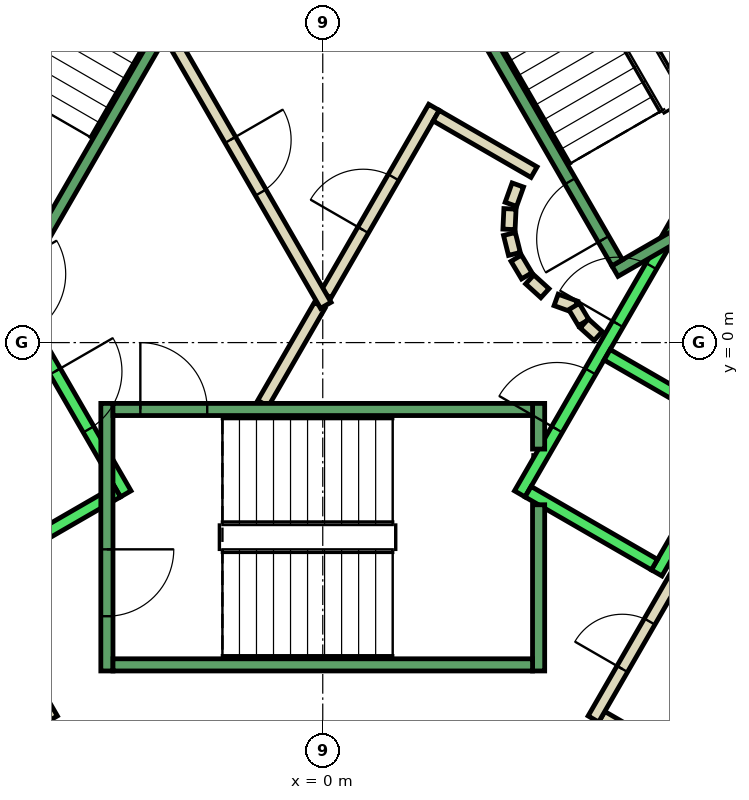
"""IFC4 building model, lengths in metres.
Left out: names, types, materials, properties, quantities, classifications, styles, units other than length and angle.
Written with IfcOpenShell. Run it as: python <this file> out.ifc"""

import sys

from ifc_helpers import new_model, si_unit, direction, frame, frame_2d, origin, place, context, subcontext, project, spatial, polyline, rectangle, outline, extrude, element, fill, save


model = new_model("IFC4")
c1 = context("Model", 3, precision=1e-05, world=origin(), true_north=direction((0.0, 1.0)))
c2 = subcontext(c1, "Body", "Model", "MODEL_VIEW")
j1 = project(units=[si_unit("LENGTHUNIT", "METRE"), si_unit("PLANEANGLEUNIT", "RADIAN")], contexts=[c1])
p1 = place(None, origin())
s1 = spatial("IfcSite", under=j1, at=p1, CompositionType="ELEMENT")
p2 = place(p1, origin())
s2 = spatial("IfcBuilding", under=s1, at=p2, CompositionType="ELEMENT")
p3 = place(p2, frame((0.0, 0.0, 252.2)))
s3 = spatial("IfcBuildingStorey", under=s2, at=p3, CompositionType="ELEMENT", Elevation=252.2)
p4 = place(p3, frame((0.0, 0.0, -0.34)))
e1 = element("IfcWall", 1, at=p4, inside=s3, PredefinedType="SHEAR", context=c2, shape_type="SweptSolid", body=[
    extrude(outline(polyline([(5.774, -7.5), (11.547, 2.5), (10.854, 2.5), (5.427, -6.9), (5.774, -7.5)])), origin(), (0.0, 0.0, 1.0), 3.6),
])
p5 = place(p3, frame((5.541, -6.703, 0.0), z_axis=(0.0, 0.0, 1.0), x_axis=(-0.86621513555, 0.499671230855, 0.0)))
e2 = element("IfcWall", 2, at=p5, inside=s3, PredefinedType="PARTITIONING", context=c2, shape_type="SweptSolid", body=[
    extrude(rectangle(XDim=1.1, YDim=0.2, at=frame_2d((0.55, 0.0))), origin(), (0.0, 0.0, 1.0), 3.26),
])
p6 = place(p3, frame((4.451, -6.19, 0.0), z_axis=(0.0, 0.0, 1.0), x_axis=(0.500011755427, 0.866018616679, 0.0)))
e3 = element("IfcWall", 3, at=p6, inside=s3, PredefinedType="PARTITIONING", context=c2, shape_type="SweptSolid", body=[
    extrude(rectangle(XDim=2.8, YDim=0.2, at=frame_2d((1.4, 0.0))), origin(), (0.0, 0.0, 1.0), 3.26),
])
p7 = place(p6, frame((0.95, 0.0, 0.0)))
e4 = element("IfcOpeningElement", 4, at=p7, cuts=e3, PredefinedType="OPENING", context=c2, shape_type="SweptSolid", body=[
    extrude(rectangle(XDim=0.9, YDim=2.1, at=frame_2d((0.45, 1.05))), frame((0.0, 0.11, 0.0), z_axis=(0.0, -1.0, 0.0), x_axis=(1.0, 0.0, 0.0)), (0.0, 0.0, 1.0), 0.22),
])
p8 = place(p3, frame((-5.851, -3.765, 0.0), z_axis=(0.0, 0.0, 1.0), x_axis=(0.500011755427, -0.866018616679, 0.0)))
e5 = element("IfcWall", 5, at=p8, inside=s3, PredefinedType="PARTITIONING", context=c2, shape_type="SweptSolid", body=[
    extrude(rectangle(XDim=2.8, YDim=0.2, at=frame_2d((1.4, 0.0))), origin(), (0.0, 0.0, 1.0), 3.26),
])
p9 = place(p8, frame((0.95, 0.0, 0.0)))
e6 = element("IfcOpeningElement", 6, at=p9, cuts=e5, PredefinedType="OPENING", context=c2, shape_type="SweptSolid", body=[
    extrude(rectangle(XDim=0.9, YDim=2.1, at=frame_2d((0.45, 1.05))), frame((0.0, 0.11, 0.0), z_axis=(0.0, -1.0, 0.0), x_axis=(1.0, 0.0, 0.0)), (0.0, 0.0, 1.0), 0.22),
])
p10 = place(p3, frame((-0.982, -1.0, 0.0), z_axis=(0.0, 0.0, 1.0), x_axis=(0.50024047865, 0.865886518847, 0.0)))
e7 = element("IfcWall", 7, at=p10, inside=s3, PredefinedType="PARTITIONING", context=c2, shape_type="SweptSolid", body=[
    extrude(rectangle(XDim=1.863, YDim=0.2, at=frame_2d((0.931, 0.0))), origin(), (0.0, 0.0, 1.0), 3.26),
])
p11 = place(p3, frame((0.05, 0.787, 0.0), z_axis=(0.0, 0.0, 1.0), x_axis=(0.499954076797, 0.866051915934, 0.0)))
e8 = element("IfcWall", 8, at=p11, inside=s3, PredefinedType="PARTITIONING", context=c2, shape_type="SweptSolid", body=[
    extrude(rectangle(XDim=3.558, YDim=0.2, at=frame_2d((1.779, 0.0))), origin(), (0.0, 0.0, 1.0), 3.26),
])
p12 = place(p11, frame((1.229, 0.0, 0.0)))
e9 = element("IfcOpeningElement", 9, at=p12, cuts=e8, PredefinedType="OPENING", context=c2, shape_type="SweptSolid", body=[
    extrude(rectangle(XDim=1.0, YDim=2.1, at=frame_2d((0.5, 1.05))), frame((0.0, 0.11, 0.0), z_axis=(0.0, -1.0, 0.0), x_axis=(1.0, 0.0, 0.0)), (0.0, 0.0, 1.0), 0.22),
])
p13 = place(p3, frame((1.866, 3.732, 0.0), z_axis=(0.0, 0.0, 1.0), x_axis=(0.866043361281, -0.499968895414, 0.0)))
e10 = element("IfcWall", 10, at=p13, inside=s3, PredefinedType="PARTITIONING", context=c2, shape_type="SweptSolid", body=[
    extrude(rectangle(XDim=1.858, YDim=0.2, at=frame_2d((0.929, 0.0))), origin(), (0.0, 0.0, 1.0), 3.26),
])
p14 = place(p3, frame((3.208, 2.592, 0.0), z_axis=(0.0, 0.0, 1.0), x_axis=(-0.337388820924, -0.941365382578, 0.0)))
e11 = element("IfcWall", 11, at=p14, inside=s3, PredefinedType="PARTITIONING", context=c2, shape_type="SweptSolid", body=[
    extrude(rectangle(XDim=0.338, YDim=0.2, at=frame_2d((0.169, 0.0))), origin(), (0.0, 0.0, 1.0), 3.26),
])
p15 = place(p3, frame((3.079, 2.199, 0.0), z_axis=(0.0, 0.0, 1.0), x_axis=(-0.047771483479, -0.998858290933, 0.0)))
e12 = element("IfcWall", 12, at=p15, inside=s3, PredefinedType="PARTITIONING", context=c2, shape_type="SweptSolid", body=[
    extrude(rectangle(XDim=0.337, YDim=0.2, at=frame_2d((0.169, 0.0))), origin(), (0.0, 0.0, 1.0), 3.26),
])
p16 = place(p3, frame((3.07, 1.786, 0.0), z_axis=(0.0, 0.0, 1.0), x_axis=(0.242705583207, -0.970099994784, 0.0)))
e13 = element("IfcWall", 13, at=p16, inside=s3, PredefinedType="PARTITIONING", context=c2, shape_type="SweptSolid", body=[
    extrude(rectangle(XDim=0.338, YDim=0.2, at=frame_2d((0.169, 0.0))), origin(), (0.0, 0.0, 1.0), 3.26),
])
for number, where, z_axis, x_axis in (
    (14, (3.182, 1.388, 0.0), (0.0, 0.0, 1.0), (0.512, -0.859, 0.0)),
    (15, (3.404, 1.039, 0.0), (0.0, 0.0, 1.0), (0.74, -0.672, 0.0)),
):
    element("IfcWall", number, at=place(p3, frame(where, z_axis=z_axis, x_axis=x_axis)), inside=s3, PredefinedType="PARTITIONING", context=c2, shape_type="SweptSolid", body=[
        extrude(rectangle(XDim=0.338, YDim=0.2, at=frame_2d((0.169, 0.0))), origin(), (0.0, 0.0, 1.0), 3.26),
    ])
p17 = place(p3, frame((3.838, 0.702, 0.0), z_axis=(0.0, 0.0, 1.0), x_axis=(0.941035081519, -0.338308993895, 0.0)))
e16 = element("IfcWall", 16, at=p17, inside=s3, PredefinedType="PARTITIONING", context=c2, shape_type="SweptSolid", body=[
    extrude(rectangle(XDim=0.337, YDim=0.2, at=frame_2d((0.168, 0.0))), origin(), (0.0, 0.0, 1.0), 3.26),
])
p18 = place(p3, frame((4.132, 0.593, 0.0), z_axis=(0.0, 0.0, 1.0), x_axis=(0.513561617048, -0.858052717201, 0.0)))
e17 = element("IfcWall", 17, at=p18, inside=s3, PredefinedType="PARTITIONING", context=c2, shape_type="SweptSolid", body=[
    extrude(rectangle(XDim=0.308, YDim=0.2, at=frame_2d((0.154, 0.0))), origin(), (0.0, 0.0, 1.0), 3.26),
])
p19 = place(p3, frame((4.301, 0.315, 0.0), z_axis=(0.0, 0.0, 1.0), x_axis=(0.741798017506, -0.670623367639, 0.0)))
e18 = element("IfcWall", 18, at=p19, inside=s3, PredefinedType="PARTITIONING", context=c2, shape_type="SweptSolid", body=[
    extrude(rectangle(XDim=0.309, YDim=0.2, at=frame_2d((0.154, 0.0))), origin(), (0.0, 0.0, 1.0), 3.26),
])
p20 = place(p3, frame((-2.54, 5.1, 0.0), z_axis=(0.0, 0.0, 1.0), x_axis=(0.499925051871, -0.866068670783, 0.0)))
e19 = element("IfcWall", 19, at=p20, inside=s3, PredefinedType="PARTITIONING", context=c2, shape_type="SweptSolid", body=[
    extrude(rectangle(XDim=5.181, YDim=0.2, at=frame_2d((2.59, 0.0))), origin(), (0.0, 0.0, 1.0), 3.26),
])
p21 = place(p20, frame((2.04, 0.0, 0.0)))
e20 = element("IfcOpeningElement", 20, at=p21, cuts=e19, PredefinedType="OPENING", context=c2, shape_type="SweptSolid", body=[
    extrude(rectangle(XDim=1.0, YDim=2.1, at=frame_2d((0.5, 1.05))), frame((0.0, 0.11, 0.0), z_axis=(0.0, -1.0, 0.0), x_axis=(1.0, 0.0, 0.0)), (0.0, 0.0, 1.0), 0.22),
])
p22 = place(p3, frame((-5.94, 2.188, 0.0), z_axis=(0.0, 0.0, 1.0), x_axis=(0.500034260056, -0.866005622828, 0.0)))
e21 = element("IfcWall", 21, at=p22, inside=s3, PredefinedType="STANDARD", context=c2, shape_type="SweptSolid", body=[
    extrude(rectangle(XDim=5.399, YDim=0.2, at=frame_2d((2.7, 0.0))), origin(), (0.0, 0.0, 1.0), 3.26),
])
p23 = place(p22, frame((3.075, 0.0, 0.0)))
e22 = element("IfcOpeningElement", 22, at=p23, cuts=e21, PredefinedType="OPENING", context=c2, shape_type="SweptSolid", body=[
    extrude(rectangle(XDim=1.1, YDim=2.1, at=frame_2d((0.55, 1.05))), frame((0.0, 0.11, 0.0), z_axis=(0.0, -1.0, 0.0), x_axis=(1.0, 0.0, 0.0)), (0.0, 0.0, 1.0), 0.22),
])
p24 = place(p22, frame((1.225, 0.0, 0.0)))
e23 = element("IfcOpeningElement", 23, at=p24, cuts=e21, PredefinedType="OPENING", context=c2, shape_type="SweptSolid", body=[
    extrude(rectangle(XDim=1.1, YDim=2.1, at=frame_2d((0.55, 1.05))), frame((0.0, 0.11, 0.0), z_axis=(0.0, -1.0, 0.0), x_axis=(1.0, 0.0, 0.0)), (0.0, 0.0, 1.0), 0.22),
])
p25 = place(p3, frame((-3.377, -2.452, 0.0), z_axis=(0.0, 0.0, 1.0), x_axis=(-0.865955154139, -0.50012165622, 0.0)))
e24 = element("IfcWall", 24, at=p25, inside=s3, PredefinedType="STANDARD", context=c2, shape_type="SweptSolid", body=[
    extrude(rectangle(XDim=2.4, YDim=0.2, at=frame_2d((1.2, 0.0))), origin(), (0.0, 0.0, 1.0), 3.26),
])
p26 = place(p3, frame((3.24, -2.488, 0.0), z_axis=(0.0, 0.0, 1.0), x_axis=(0.500034260056, 0.866005622828, 0.0)))
e25 = element("IfcWall", 25, at=p26, inside=s3, PredefinedType="STANDARD", context=c2, shape_type="SweptSolid", body=[
    extrude(rectangle(XDim=5.399, YDim=0.2, at=frame_2d((2.7, 0.0))), origin(), (0.0, 0.0, 1.0), 3.26),
])
p27 = place(p26, frame((3.225, 0.0, 0.0)))
e26 = element("IfcOpeningElement", 26, at=p27, cuts=e25, PredefinedType="OPENING", context=c2, shape_type="SweptSolid", body=[
    extrude(rectangle(XDim=1.1, YDim=2.1, at=frame_2d((0.55, 1.05))), frame((0.0, 0.11, 0.0), z_axis=(0.0, -1.0, 0.0), x_axis=(1.0, 0.0, 0.0)), (0.0, 0.0, 1.0), 0.22),
])
p28 = place(p26, frame((1.225, 0.0, 0.0)))
e27 = element("IfcOpeningElement", 27, at=p28, cuts=e25, PredefinedType="OPENING", context=c2, shape_type="SweptSolid", body=[
    extrude(rectangle(XDim=1.1, YDim=2.1, at=frame_2d((0.55, 1.05))), frame((0.0, 0.11, 0.0), z_axis=(0.0, -1.0, 0.0), x_axis=(1.0, 0.0, 0.0)), (0.0, 0.0, 1.0), 0.22),
])
p29 = place(p3, frame((5.492, -3.788, 0.0), z_axis=(0.0, 0.0, 1.0), x_axis=(0.500034260056, 0.866005622828, 0.0)))
e28 = element("IfcWall", 28, at=p29, inside=s3, PredefinedType="STANDARD", context=c2, shape_type="SweptSolid", body=[
    extrude(rectangle(XDim=5.399, YDim=0.2, at=frame_2d((2.7, 0.0))), origin(), (0.0, 0.0, 1.0), 3.26),
])
p30 = place(p3, frame((3.377, -2.452, 0.0), z_axis=(0.0, 0.0, 1.0), x_axis=(0.865955154139, -0.50012165622, 0.0)))
e29 = element("IfcWall", 29, at=p30, inside=s3, PredefinedType="STANDARD", context=c2, shape_type="SweptSolid", body=[
    extrude(rectangle(XDim=2.4, YDim=0.2, at=frame_2d((1.2, 0.0))), origin(), (0.0, 0.0, 1.0), 3.26),
])
p31 = place(p3, frame((4.677, -0.2, 0.0), z_axis=(0.0, 0.0, 1.0), x_axis=(0.865973769406, -0.500089422704, 0.0)))
e30 = element("IfcWall", 30, at=p31, inside=s3, PredefinedType="STANDARD", context=c2, shape_type="SweptSolid", body=[
    extrude(rectangle(XDim=2.399, YDim=0.2, at=frame_2d((1.2, 0.0))), origin(), (0.0, 0.0, 1.0), 3.26),
])
p32 = place(p3, frame((-3.55, -1.0, 0.0), z_axis=(0.0, 0.0, 1.0), x_axis=(0.0, -1.0, 0.0)))
e31 = element("IfcWall", 31, at=p32, inside=s3, PredefinedType="STANDARD", context=c2, shape_type="SweptSolid", body=[
    extrude(rectangle(XDim=4.4, YDim=0.2, at=frame_2d((2.2, 0.0))), origin(), (0.0, 0.0, 1.0), 3.26),
])
p33 = place(p32, frame((2.4, 0.0, 0.0)))
e32 = element("IfcOpeningElement", 32, at=p33, cuts=e31, PredefinedType="OPENING", context=c2, shape_type="SweptSolid", body=[
    extrude(rectangle(XDim=1.1, YDim=2.2, at=frame_2d((0.55, 1.1))), frame((0.0, 0.11, 0.0), z_axis=(0.0, -1.0, 0.0), x_axis=(1.0, 0.0, 0.0)), (0.0, 0.0, 1.0), 0.22),
])
p34 = place(p3, frame((3.55, -2.667, 0.0), z_axis=(0.0, 0.0, 1.0), x_axis=(0.0, -1.0, 0.0)))
e33 = element("IfcWall", 33, at=p34, inside=s3, PredefinedType="STANDARD", context=c2, shape_type="SweptSolid", body=[
    extrude(rectangle(XDim=2.733, YDim=0.2, at=frame_2d((1.366, 0.0))), origin(), (0.0, 0.0, 1.0), 3.26),
])
p35 = place(p3, frame((3.55, -1.0, 0.0), z_axis=(0.0, 0.0, 1.0), x_axis=(0.0, -1.0, 0.0)))
e34 = element("IfcWall", 34, at=p35, inside=s3, PredefinedType="STANDARD", context=c2, shape_type="SweptSolid", body=[
    extrude(rectangle(XDim=0.751, YDim=0.2, at=frame_2d((0.375, 0.0))), origin(), (0.0, 0.0, 1.0), 3.26),
])
p36 = place(p3, frame((-3.45, -1.1, 0.0), z_axis=(0.0, 0.0, 1.0), x_axis=(1.0, 0.0, 0.0)))
e35 = element("IfcWall", 35, at=p36, inside=s3, PredefinedType="STANDARD", context=c2, shape_type="SweptSolid", body=[
    extrude(rectangle(XDim=6.9, YDim=0.2, at=frame_2d((3.45, 0.0))), origin(), (0.0, 0.0, 1.0), 3.26),
])
p37 = place(p36, frame((0.45, 0.0, 0.0)))
e36 = element("IfcOpeningElement", 36, at=p37, cuts=e35, PredefinedType="OPENING", context=c2, shape_type="SweptSolid", body=[
    extrude(rectangle(XDim=1.1, YDim=2.2, at=frame_2d((0.55, 1.1))), frame((0.0, 0.11, 0.0), z_axis=(0.0, -1.0, 0.0), x_axis=(1.0, 0.0, 0.0)), (0.0, 0.0, 1.0), 0.22),
])
p38 = place(p3, frame((-3.45, -5.3, 0.0), z_axis=(0.0, 0.0, 1.0), x_axis=(1.0, 0.0, 0.0)))
e37 = element("IfcWall", 37, at=p38, inside=s3, PredefinedType="STANDARD", context=c2, shape_type="SweptSolid", body=[
    extrude(rectangle(XDim=6.9, YDim=0.2, at=frame_2d((3.45, 0.0))), origin(), (0.0, 0.0, 1.0), 3.26),
])
p39 = place(p3, frame((4.806, 1.176, 0.0), z_axis=(0.0, 0.0, 1.0), x_axis=(0.866059941101, 0.499940174841, 0.0)))
e38 = element("IfcWall", 38, at=p39, inside=s3, PredefinedType="STANDARD", context=c2, shape_type="SweptSolid", body=[
    extrude(rectangle(XDim=4.4, YDim=0.2, at=frame_2d((2.2, 0.0))), origin(), (0.0, 0.0, 1.0), 3.26),
])
p40 = place(p39, frame((2.4, 0.0, 0.0)))
e39 = element("IfcOpeningElement", 39, at=p40, cuts=e38, PredefinedType="OPENING", context=c2, shape_type="SweptSolid", body=[
    extrude(rectangle(XDim=1.1, YDim=2.2, at=frame_2d((0.55, 1.1))), frame((0.0, 0.11, 0.0), z_axis=(0.0, -1.0, 0.0), x_axis=(1.0, 0.0, 0.0)), (0.0, 0.0, 1.0), 0.22),
])
p41 = place(p3, frame((4.843, 1.312, 0.0), z_axis=(0.0, 0.0, 1.0), x_axis=(-0.499963383562, 0.866046543262, 0.0)))
e40 = element("IfcWall", 40, at=p41, inside=s3, PredefinedType="STANDARD", context=c2, shape_type="SweptSolid", body=[
    extrude(rectangle(XDim=6.9, YDim=0.2, at=frame_2d((3.45, 0.0))), origin(), (0.0, 0.0, 1.0), 3.26),
])
p42 = place(p41, frame((0.45, 0.0, 0.0)))
e41 = element("IfcOpeningElement", 41, at=p42, cuts=e40, PredefinedType="OPENING", context=c2, shape_type="SweptSolid", body=[
    extrude(rectangle(XDim=1.1, YDim=2.2, at=frame_2d((0.55, 1.1))), frame((0.0, 0.11, 0.0), z_axis=(0.0, -1.0, 0.0), x_axis=(1.0, 0.0, 0.0)), (0.0, 0.0, 1.0), 0.22),
])
p43 = place(p3, frame((8.48, 3.412, 0.0), z_axis=(0.0, 0.0, 1.0), x_axis=(-0.499978703459, 0.866037698999, 0.0)))
e42 = element("IfcWall", 42, at=p43, inside=s3, PredefinedType="STANDARD", context=c2, shape_type="SweptSolid", body=[
    extrude(rectangle(XDim=6.9, YDim=0.2, at=frame_2d((3.45, 0.0))), origin(), (0.0, 0.0, 1.0), 3.26),
])
p44 = place(p3, frame((-1.393, 7.288, 0.0), z_axis=(0.0, 0.0, 1.0), x_axis=(-0.499963383562, -0.866046543262, 0.0)))
e43 = element("IfcWall", 43, at=p44, inside=s3, PredefinedType="STANDARD", context=c2, shape_type="SweptSolid", body=[
    extrude(rectangle(XDim=6.9, YDim=0.2, at=frame_2d((3.45, 0.0))), origin(), (0.0, 0.0, 1.0), 3.26),
])
p45 = place(p44, frame((0.45, 0.0, 0.0)))
e44 = element("IfcOpeningElement", 44, at=p45, cuts=e43, PredefinedType="OPENING", context=c2, shape_type="SweptSolid", body=[
    extrude(rectangle(XDim=1.1, YDim=2.2, at=frame_2d((0.55, 1.1))), frame((0.0, 0.11, 0.0), z_axis=(0.0, -1.0, 0.0), x_axis=(1.0, 0.0, 0.0)), (0.0, 0.0, 1.0), 0.22),
])
p46 = place(p12, origin())
e45 = element("IfcDoor", 45, at=p46, inside=s3, OperationType="SINGLE_SWING_RIGHT", PredefinedType="DOOR", context=c2, shape_type="SweptSolid", body=[
    extrude(rectangle(XDim=1.0, YDim=2.1, at=frame_2d((0.5, 1.05))), frame((0.0, 0.025, 0.0), z_axis=(0.0, -1.0, 0.0), x_axis=(1.0, 0.0, 0.0)), (0.0, 0.0, 1.0), 0.05),
])
fill(e9, e45)
p47 = place(p21, origin())
e46 = element("IfcDoor", 46, at=p47, inside=s3, OperationType="SINGLE_SWING_RIGHT", PredefinedType="DOOR", context=c2, shape_type="SweptSolid", body=[
    extrude(rectangle(XDim=1.0, YDim=2.1, at=frame_2d((0.5, 1.05))), frame((0.0, 0.025, 0.0), z_axis=(0.0, -1.0, 0.0), x_axis=(1.0, 0.0, 0.0)), (0.0, 0.0, 1.0), 0.05),
])
fill(e20, e46)
p48 = place(p7, origin())
e47 = element("IfcDoor", 47, at=p48, inside=s3, OperationType="SINGLE_SWING_LEFT", PredefinedType="DOOR", context=c2, shape_type="SweptSolid", body=[
    extrude(rectangle(XDim=0.9, YDim=2.1, at=frame_2d((0.45, 1.05))), frame((0.0, 0.025, 0.0), z_axis=(0.0, -1.0, 0.0), x_axis=(1.0, 0.0, 0.0)), (0.0, 0.0, 1.0), 0.05),
])
fill(e4, e47)
p49 = place(p27, origin())
e48 = element("IfcDoor", 48, at=p49, inside=s3, OperationType="SLIDING_TO_LEFT", PredefinedType="DOOR", context=c2, shape_type="SweptSolid", body=[
    extrude(rectangle(XDim=1.1, YDim=2.1, at=frame_2d((0.55, 1.05))), frame((0.0, 0.025, 0.0), z_axis=(0.0, -1.0, 0.0), x_axis=(1.0, 0.0, 0.0)), (0.0, 0.0, 1.0), 0.05),
])
fill(e26, e48)
p50 = place(p23, origin())
e49 = element("IfcDoor", 49, at=p50, inside=s3, OperationType="SLIDING_TO_LEFT", PredefinedType="DOOR", context=c2, shape_type="SweptSolid", body=[
    extrude(rectangle(XDim=1.1, YDim=2.1, at=frame_2d((0.55, 1.05))), frame((0.0, 0.025, 0.0), z_axis=(0.0, -1.0, 0.0), x_axis=(1.0, 0.0, 0.0)), (0.0, 0.0, 1.0), 0.05),
])
fill(e22, e49)
p51 = place(p28, origin())
e50 = element("IfcDoor", 50, at=p51, inside=s3, OperationType="SLIDING_TO_LEFT", PredefinedType="DOOR", context=c2, shape_type="SweptSolid", body=[
    extrude(rectangle(XDim=1.1, YDim=2.1, at=frame_2d((0.55, 1.05))), frame((0.0, 0.025, 0.0), z_axis=(0.0, -1.0, 0.0), x_axis=(1.0, 0.0, 0.0)), (0.0, 0.0, 1.0), 0.05),
])
fill(e27, e50)
p52 = place(p37, origin())
e51 = element("IfcDoor", 51, at=p52, inside=s3, OperationType="SINGLE_SWING_LEFT", PredefinedType="DOOR", context=c2, shape_type="SweptSolid", body=[
    extrude(rectangle(XDim=1.1, YDim=2.2, at=frame_2d((0.55, 1.1))), frame((0.0, 0.025, 0.0), z_axis=(0.0, -1.0, 0.0), x_axis=(1.0, 0.0, 0.0)), (0.0, 0.0, 1.0), 0.05),
])
fill(e36, e51)
p53 = place(p33, origin())
e52 = element("IfcDoor", 52, at=p53, inside=s3, OperationType="SINGLE_SWING_LEFT", PredefinedType="DOOR", context=c2, shape_type="SweptSolid", body=[
    extrude(rectangle(XDim=1.1, YDim=2.2, at=frame_2d((0.55, 1.1))), frame((0.0, 0.025, 0.0), z_axis=(0.0, -1.0, 0.0), x_axis=(1.0, 0.0, 0.0)), (0.0, 0.0, 1.0), 0.05),
])
fill(e32, e52)
p54 = place(p42, origin())
e53 = element("IfcDoor", 53, at=p54, inside=s3, OperationType="SINGLE_SWING_LEFT", PredefinedType="DOOR", context=c2, shape_type="SweptSolid", body=[
    extrude(rectangle(XDim=1.1, YDim=2.2, at=frame_2d((0.55, 1.1))), frame((0.0, 0.025, 0.0), z_axis=(0.0, -1.0, 0.0), x_axis=(1.0, 0.0, 0.0)), (0.0, 0.0, 1.0), 0.05),
])
fill(e41, e53)
save(model, sys.argv[1])
